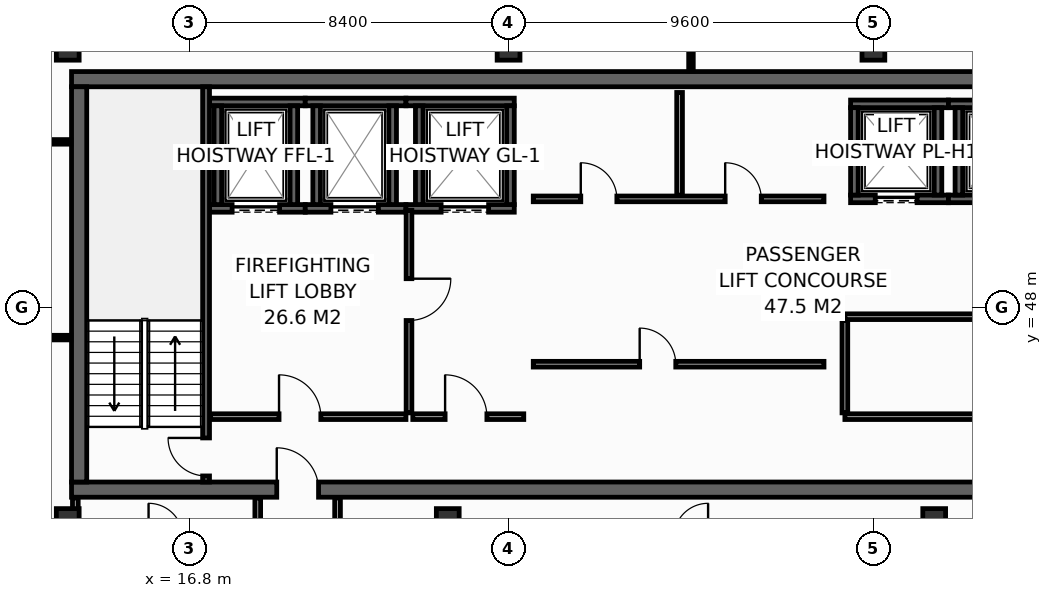
"""IFC4 building model, lengths in metres.
Left out: names, types, materials, properties, quantities, classifications, styles, units other than length and angle.
Written with IfcOpenShell. Run it as: python <this file> out.ifc"""

import sys

from ifc_helpers import new_model, si_unit, direction, frame, frame_2d, origin, origin_2d, place, context, subcontext, project, spatial, rectangle, hollow_rectangle, extrude, element, fill, save


model = new_model("IFC4")
c1 = context("Model", 3, precision=1e-05, world=origin(), true_north=direction((0.0, 1.0)))
c2 = subcontext(c1, "Body", "Model", "MODEL_VIEW")
j1 = project(units=[si_unit("LENGTHUNIT", "METRE"), si_unit("PLANEANGLEUNIT", "RADIAN")], contexts=[c1])
p1 = place(None, origin())
s1 = spatial("IfcSite", under=j1, at=p1, CompositionType="ELEMENT")
p2 = place(p1, origin())
s2 = spatial("IfcBuilding", under=s1, at=p2, CompositionType="ELEMENT")
p3 = place(p2, frame((0.0, 0.0, 306.6)))
s3 = spatial("IfcBuildingStorey", under=s2, at=p3, CompositionType="ELEMENT", Elevation=306.6)
p4 = place(p3, frame((13.7, 43.2, 0.0), z_axis=(0.0, 0.0, 1.0), x_axis=(1.0, 0.0, 0.0)))
e1 = element("IfcWall", 1, at=p4, inside=s3, PredefinedType="SHEAR", context=c2, shape_type="SweptSolid", body=[
    extrude(rectangle(XDim=32.5, YDim=0.4, at=frame_2d((16.25, 0.0))), origin(), (0.0, 0.0, 1.0), 3.55),
])
p5 = place(p4, frame((5.4, 0.0, 0.0)))
e2 = element("IfcOpeningElement", 2, at=p5, cuts=e1, PredefinedType="OPENING", context=c2, shape_type="SweptSolid", body=[
    extrude(rectangle(XDim=1.1, YDim=2.15, at=frame_2d((0.55, 1.075))), frame((0.0, 0.21, 0.0), z_axis=(0.0, -1.0, 0.0), x_axis=(1.0, 0.0, 0.0)), (0.0, 0.0, 1.0), 0.42),
])
p6 = place(p4, frame((25.6, 0.0, 0.0)))
e3 = element("IfcOpeningElement", 3, at=p6, cuts=e1, PredefinedType="OPENING", context=c2, shape_type="SweptSolid", body=[
    extrude(rectangle(XDim=1.1, YDim=2.15, at=frame_2d((0.55, 1.075))), frame((0.0, 0.21, 0.0), z_axis=(0.0, -1.0, 0.0), x_axis=(1.0, 0.0, 0.0)), (0.0, 0.0, 1.0), 0.42),
])
p7 = place(p3, frame((13.7, 54.0, 0.0), z_axis=(0.0, 0.0, 1.0), x_axis=(1.0, 0.0, 0.0)))
e4 = element("IfcWall", 4, at=p7, inside=s3, PredefinedType="SHEAR", context=c2, shape_type="SweptSolid", body=[
    extrude(rectangle(XDim=32.5, YDim=0.4, at=frame_2d((16.25, 0.0))), origin(), (0.0, 0.0, 1.0), 3.55),
])
p8 = place(p3, frame((13.9, 43.4, 0.0), z_axis=(0.0, 0.0, 1.0), x_axis=(0.0, 1.0, 0.0)))
e5 = element("IfcWall", 5, at=p8, inside=s3, PredefinedType="SHEAR", context=c2, shape_type="SweptSolid", body=[
    extrude(rectangle(XDim=10.4, YDim=0.4, at=frame_2d((5.2, 0.0))), origin(), (0.0, 0.0, 1.0), 3.55),
])
for number, where, z_axis, x_axis in (
    (6, (13.6, 54.8, 0.0), (0.0, 0.0, 1.0), (1.0, 0.0, 0.0)),
    (7, (25.2, 54.8, 0.0), (0.0, 0.0, 1.0), (1.0, 0.0, 0.0)),
    (8, (34.8, 54.8, 0.0), (0.0, 0.0, 1.0), (1.0, 0.0, 0.0)),
    (9, (13.6, 42.4, 0.0), (0.0, 0.0, 1.0), (1.0, 0.0, 0.0)),
    (10, (23.6, 42.4, 0.0), (0.0, 0.0, 1.0), (1.0, 0.0, 0.0)),
    (11, (36.4, 42.4, 0.0), (0.0, 0.0, 1.0), (1.0, 0.0, 0.0)),
):
    element("IfcColumn", number, at=place(p3, frame(where, z_axis=z_axis, x_axis=x_axis)), inside=s3, PredefinedType="COLUMN", context=c2, shape_type="SweptSolid", body=[
        extrude(hollow_rectangle(XDim=0.6, YDim=0.6, WallThickness=0.028, at=origin_2d()), origin(), (0.0, 0.0, 1.0), 3.8),
    ])
p9 = place(p3, frame((17.33, 50.6, 0.0), z_axis=(0.0, 0.0, 1.0), x_axis=(1.0, 0.0, 0.0)))
e12 = element("IfcWall", 12, at=p9, inside=s3, PredefinedType="SHEAR", context=c2, shape_type="SweptSolid", body=[
    extrude(rectangle(XDim=2.52, YDim=0.2, at=frame_2d((1.26, 0.0))), origin(), (0.0, 0.0, 1.0), 3.55),
])
p10 = place(p9, frame((0.595, 0.0, 0.0)))
e13 = element("IfcOpeningElement", 13, at=p10, cuts=e12, PredefinedType="OPENING", context=c2, shape_type="SweptSolid", body=[
    extrude(rectangle(XDim=1.25, YDim=2.3, at=frame_2d((0.625, 1.15))), frame((0.0, 0.11, 0.0), z_axis=(0.0, -1.0, 0.0), x_axis=(1.0, 0.0, 0.0)), (0.0, 0.0, 1.0), 0.22),
])
p11 = place(p3, frame((17.33, 53.4, 0.0), z_axis=(0.0, 0.0, 1.0), x_axis=(1.0, 0.0, 0.0)))
e14 = element("IfcWall", 14, at=p11, inside=s3, PredefinedType="SHEAR", context=c2, shape_type="SweptSolid", body=[
    extrude(rectangle(XDim=2.52, YDim=0.2, at=frame_2d((1.26, 0.0))), origin(), (0.0, 0.0, 1.0), 3.55),
])
for number, where, z_axis, x_axis in (
    (15, (17.55, 50.7, 0.0), (0.0, 0.0, 1.0), (0.0, 1.0, 0.0)),
    (16, (19.55, 50.7, 0.0), (0.0, 0.0, 1.0), (0.0, 1.0, 0.0)),
):
    element("IfcWall", number, at=place(p3, frame(where, z_axis=z_axis, x_axis=x_axis)), inside=s3, PredefinedType="SHEAR", context=c2, shape_type="SweptSolid", body=[
        extrude(rectangle(XDim=2.6, YDim=0.2, at=frame_2d((1.3, 0.0))), origin(), (0.0, 0.0, 1.0), 3.55),
    ])
p12 = place(p3, frame((19.85, 50.6, 0.0), z_axis=(0.0, 0.0, 1.0), x_axis=(1.0, 0.0, 0.0)))
e17 = element("IfcWall", 17, at=p12, inside=s3, PredefinedType="SHEAR", context=c2, shape_type="SweptSolid", body=[
    extrude(rectangle(XDim=2.65, YDim=0.2, at=frame_2d((1.325, 0.0))), origin(), (0.0, 0.0, 1.0), 3.55),
])
p13 = place(p12, frame((0.675, 0.0, 0.0)))
e18 = element("IfcOpeningElement", 18, at=p13, cuts=e17, PredefinedType="OPENING", context=c2, shape_type="SweptSolid", body=[
    extrude(rectangle(XDim=1.25, YDim=2.3, at=frame_2d((0.625, 1.15))), frame((0.0, 0.11, 0.0), z_axis=(0.0, -1.0, 0.0), x_axis=(1.0, 0.0, 0.0)), (0.0, 0.0, 1.0), 0.22),
])
p14 = place(p3, frame((19.85, 53.4, 0.0), z_axis=(0.0, 0.0, 1.0), x_axis=(1.0, 0.0, 0.0)))
e19 = element("IfcWall", 19, at=p14, inside=s3, PredefinedType="SHEAR", context=c2, shape_type="SweptSolid", body=[
    extrude(rectangle(XDim=2.65, YDim=0.2, at=frame_2d((1.325, 0.0))), origin(), (0.0, 0.0, 1.0), 3.55),
])
for number, where, z_axis, x_axis in (
    (20, (20.15, 50.7, 0.0), (0.0, 0.0, 1.0), (0.0, 1.0, 0.0)),
    (21, (22.15, 50.7, 0.0), (0.0, 0.0, 1.0), (0.0, 1.0, 0.0)),
):
    element("IfcWall", number, at=place(p3, frame(where, z_axis=z_axis, x_axis=x_axis)), inside=s3, PredefinedType="SHEAR", context=c2, shape_type="SweptSolid", body=[
        extrude(rectangle(XDim=2.6, YDim=0.2, at=frame_2d((1.3, 0.0))), origin(), (0.0, 0.0, 1.0), 3.55),
    ])
p15 = place(p3, frame((22.5, 50.6, 0.0), z_axis=(0.0, 0.0, 1.0), x_axis=(1.0, 0.0, 0.0)))
e22 = element("IfcWall", 22, at=p15, inside=s3, PredefinedType="SHEAR", context=c2, shape_type="SweptSolid", body=[
    extrude(rectangle(XDim=2.85, YDim=0.2, at=frame_2d((1.425, 0.0))), origin(), (0.0, 0.0, 1.0), 3.55),
])
p16 = place(p15, frame((0.925, 0.0, 0.0)))
e23 = element("IfcOpeningElement", 23, at=p16, cuts=e22, PredefinedType="OPENING", context=c2, shape_type="SweptSolid", body=[
    extrude(rectangle(XDim=1.25, YDim=2.3, at=frame_2d((0.625, 1.15))), frame((0.0, 0.11, 0.0), z_axis=(0.0, -1.0, 0.0), x_axis=(1.0, 0.0, 0.0)), (0.0, 0.0, 1.0), 0.22),
])
p17 = place(p3, frame((22.5, 53.4, 0.0), z_axis=(0.0, 0.0, 1.0), x_axis=(1.0, 0.0, 0.0)))
e24 = element("IfcWall", 24, at=p17, inside=s3, PredefinedType="SHEAR", context=c2, shape_type="SweptSolid", body=[
    extrude(rectangle(XDim=2.85, YDim=0.2, at=frame_2d((1.425, 0.0))), origin(), (0.0, 0.0, 1.0), 3.55),
])
for number, where, z_axis, x_axis in (
    (25, (22.85, 50.7, 0.0), (0.0, 0.0, 1.0), (0.0, 1.0, 0.0)),
    (26, (25.25, 50.7, 0.0), (0.0, 0.0, 1.0), (0.0, 1.0, 0.0)),
):
    element("IfcWall", number, at=place(p3, frame(where, z_axis=z_axis, x_axis=x_axis)), inside=s3, PredefinedType="SHEAR", context=c2, shape_type="SweptSolid", body=[
        extrude(rectangle(XDim=2.6, YDim=0.2, at=frame_2d((1.3, 0.0))), origin(), (0.0, 0.0, 1.0), 3.55),
    ])
p18 = place(p3, frame((34.2, 50.85, 0.0), z_axis=(0.0, 0.0, 1.0), x_axis=(1.0, 0.0, 0.0)))
e27 = element("IfcWall", 27, at=p18, inside=s3, PredefinedType="SHEAR", context=c2, shape_type="SweptSolid", body=[
    extrude(rectangle(XDim=2.575, YDim=0.2, at=frame_2d((1.288, 0.0))), origin(), (0.0, 0.0, 1.0), 3.55),
])
p19 = place(p18, frame((0.65, 0.0, 0.0)))
e28 = element("IfcOpeningElement", 28, at=p19, cuts=e27, PredefinedType="OPENING", context=c2, shape_type="SweptSolid", body=[
    extrude(rectangle(XDim=1.1, YDim=2.2, at=frame_2d((0.55, 1.1))), frame((0.0, 0.11, 0.0), z_axis=(0.0, -1.0, 0.0), x_axis=(1.0, 0.0, 0.0)), (0.0, 0.0, 1.0), 0.22),
])
p20 = place(p3, frame((34.2, 53.35, 0.0), z_axis=(0.0, 0.0, 1.0), x_axis=(1.0, 0.0, 0.0)))
e29 = element("IfcWall", 29, at=p20, inside=s3, PredefinedType="SHEAR", context=c2, shape_type="SweptSolid", body=[
    extrude(rectangle(XDim=2.575, YDim=0.2, at=frame_2d((1.288, 0.0))), origin(), (0.0, 0.0, 1.0), 3.55),
])
for number, where, z_axis, x_axis in (
    (30, (34.3, 50.95, 0.0), (0.0, 0.0, 1.0), (0.0, 1.0, 0.0)),
    (31, (36.5, 50.95, 0.0), (0.0, 0.0, 1.0), (0.0, 1.0, 0.0)),
):
    element("IfcWall", number, at=place(p3, frame(where, z_axis=z_axis, x_axis=x_axis)), inside=s3, PredefinedType="SHEAR", context=c2, shape_type="SweptSolid", body=[
        extrude(rectangle(XDim=2.3, YDim=0.2, at=frame_2d((1.15, 0.0))), origin(), (0.0, 0.0, 1.0), 3.55),
    ])
p21 = place(p3, frame((36.775, 50.85, 0.0), z_axis=(0.0, 0.0, 1.0), x_axis=(1.0, 0.0, 0.0)))
e32 = element("IfcWall", 32, at=p21, inside=s3, PredefinedType="SHEAR", context=c2, shape_type="SweptSolid", body=[
    extrude(rectangle(XDim=2.75, YDim=0.2, at=frame_2d((1.375, 0.0))), origin(), (0.0, 0.0, 1.0), 3.55),
])
p22 = place(p21, frame((0.825, 0.0, 0.0)))
e33 = element("IfcOpeningElement", 33, at=p22, cuts=e32, PredefinedType="OPENING", context=c2, shape_type="SweptSolid", body=[
    extrude(rectangle(XDim=1.1, YDim=2.2, at=frame_2d((0.55, 1.1))), frame((0.0, 0.11, 0.0), z_axis=(0.0, -1.0, 0.0), x_axis=(1.0, 0.0, 0.0)), (0.0, 0.0, 1.0), 0.22),
])
p23 = place(p3, frame((36.775, 53.35, 0.0), z_axis=(0.0, 0.0, 1.0), x_axis=(1.0, 0.0, 0.0)))
e34 = element("IfcWall", 34, at=p23, inside=s3, PredefinedType="SHEAR", context=c2, shape_type="SweptSolid", body=[
    extrude(rectangle(XDim=2.75, YDim=0.2, at=frame_2d((1.375, 0.0))), origin(), (0.0, 0.0, 1.0), 3.55),
])
p24 = place(p3, frame((37.05, 50.95, 0.0), z_axis=(0.0, 0.0, 1.0), x_axis=(0.0, 1.0, 0.0)))
e35 = element("IfcWall", 35, at=p24, inside=s3, PredefinedType="SHEAR", context=c2, shape_type="SweptSolid", body=[
    extrude(rectangle(XDim=2.3, YDim=0.2, at=frame_2d((1.15, 0.0))), origin(), (0.0, 0.0, 1.0), 3.55),
])
p25 = place(p3, frame((17.24, 43.4, 0.0), z_axis=(0.0, 0.0, 1.0), x_axis=(0.0, 1.0, 0.0)))
e36 = element("IfcWall", 36, at=p25, inside=s3, PredefinedType="SHEAR", context=c2, shape_type="SweptSolid", body=[
    extrude(rectangle(XDim=10.4, YDim=0.18, at=frame_2d((5.2, 0.0))), origin(), (0.0, 0.0, 1.0), 3.55),
])
p26 = place(p25, frame((0.16, 0.0, 0.0)))
e37 = element("IfcOpeningElement", 37, at=p26, cuts=e36, PredefinedType="OPENING", context=c2, shape_type="SweptSolid", body=[
    extrude(rectangle(XDim=1.0, YDim=2.15, at=frame_2d((0.5, 1.075))), frame((0.0, 0.1, 0.0), z_axis=(0.0, -1.0, 0.0), x_axis=(1.0, 0.0, 0.0)), (0.0, 0.0, 1.0), 0.2),
])
p27 = place(p3, frame((17.36, 45.12, 0.0), z_axis=(0.0, 0.0, 1.0), x_axis=(1.0, 0.0, 0.0)))
e38 = element("IfcWall", 38, at=p27, inside=s3, PredefinedType="PARTITIONING", context=c2, shape_type="SweptSolid", body=[
    extrude(rectangle(XDim=5.14, YDim=0.15, at=frame_2d((2.57, 0.0))), origin(), (0.0, 0.0, 1.0), 3.55),
])
p28 = place(p27, frame((1.8, 0.0, 0.0)))
e39 = element("IfcOpeningElement", 39, at=p28, cuts=e38, PredefinedType="OPENING", context=c2, shape_type="SweptSolid", body=[
    extrude(rectangle(XDim=1.1, YDim=2.15, at=frame_2d((0.55, 1.075))), frame((0.0, 0.085, 0.0), z_axis=(0.0, -1.0, 0.0), x_axis=(1.0, 0.0, 0.0)), (0.0, 0.0, 1.0), 0.17),
])
p29 = place(p3, frame((22.58, 50.55, 0.0), z_axis=(0.0, 0.0, 1.0), x_axis=(0.0, -1.0, 0.0)))
e40 = element("IfcWall", 40, at=p29, inside=s3, PredefinedType="PARTITIONING", context=c2, shape_type="SweptSolid", body=[
    extrude(rectangle(XDim=5.33, YDim=0.15, at=frame_2d((2.665, 0.0))), origin(), (0.0, 0.0, 1.0), 3.55),
])
p30 = place(p29, frame((1.8, 0.0, 0.0)))
e41 = element("IfcOpeningElement", 41, at=p30, cuts=e40, PredefinedType="OPENING", context=c2, shape_type="SweptSolid", body=[
    extrude(rectangle(XDim=1.1, YDim=2.15, at=frame_2d((0.55, 1.075))), frame((0.0, 0.085, 0.0), z_axis=(0.0, -1.0, 0.0), x_axis=(1.0, 0.0, 0.0)), (0.0, 0.0, 1.0), 0.17),
])
p31 = place(p3, frame((22.68, 45.12, 0.0), z_axis=(0.0, 0.0, 1.0), x_axis=(1.0, 0.0, 0.0)))
e42 = element("IfcWall", 42, at=p31, inside=s3, PredefinedType="PARTITIONING", context=c2, shape_type="SweptSolid", body=[
    extrude(rectangle(XDim=2.92, YDim=0.15, at=frame_2d((1.46, 0.0))), origin(), (0.0, 0.0, 1.0), 3.55),
])
p32 = place(p31, frame((0.85, 0.0, 0.0)))
e43 = element("IfcOpeningElement", 43, at=p32, cuts=e42, PredefinedType="OPENING", context=c2, shape_type="SweptSolid", body=[
    extrude(rectangle(XDim=1.1, YDim=2.15, at=frame_2d((0.55, 1.075))), frame((0.0, 0.085, 0.0), z_axis=(0.0, -1.0, 0.0), x_axis=(1.0, 0.0, 0.0)), (0.0, 0.0, 1.0), 0.17),
])
p33 = place(p3, frame((34.05, 45.12, 0.0), z_axis=(0.0, 0.0, 1.0), x_axis=(1.0, 0.0, 0.0)))
e44 = element("IfcWall", 44, at=p33, inside=s3, PredefinedType="PARTITIONING", context=c2, shape_type="SweptSolid", body=[
    extrude(rectangle(XDim=8.45, YDim=0.15, at=frame_2d((4.225, 0.0))), origin(), (0.0, 0.0, 1.0), 3.55),
])
p34 = place(p33, frame((3.6, 0.0, 0.0)))
e45 = element("IfcOpeningElement", 45, at=p34, cuts=e44, PredefinedType="OPENING", context=c2, shape_type="SweptSolid", body=[
    extrude(rectangle(XDim=0.95, YDim=2.15, at=frame_2d((0.475, 1.075))), frame((0.0, 0.085, 0.0), z_axis=(0.0, -1.0, 0.0), x_axis=(1.0, 0.0, 0.0)), (0.0, 0.0, 1.0), 0.17),
])
p35 = place(p3, frame((34.05, 47.75, 0.0), z_axis=(0.0, 0.0, 1.0), x_axis=(1.0, 0.0, 0.0)))
e46 = element("IfcWall", 46, at=p35, inside=s3, PredefinedType="PARTITIONING", context=c2, shape_type="SweptSolid", body=[
    extrude(rectangle(XDim=8.45, YDim=0.15, at=frame_2d((4.225, 0.0))), origin(), (0.0, 0.0, 1.0), 3.55),
])
p36 = place(p3, frame((34.05, 45.22, 0.0), z_axis=(0.0, 0.0, 1.0), x_axis=(0.0, 1.0, 0.0)))
e47 = element("IfcWall", 47, at=p36, inside=s3, PredefinedType="PARTITIONING", context=c2, shape_type="SweptSolid", body=[
    extrude(rectangle(XDim=2.43, YDim=0.15, at=frame_2d((1.215, 0.0))), origin(), (0.0, 0.0, 1.0), 3.55),
])
p37 = place(p3, frame((25.85, 50.85, 0.0), z_axis=(0.0, 0.0, 1.0), x_axis=(1.0, 0.0, 0.0)))
e48 = element("IfcWall", 48, at=p37, inside=s3, PredefinedType="PARTITIONING", context=c2, shape_type="SweptSolid", body=[
    extrude(rectangle(XDim=7.65, YDim=0.15, at=frame_2d((3.825, 0.0))), origin(), (0.0, 0.0, 1.0), 3.55),
])
p38 = place(p37, frame((1.25, 0.0, 0.0)))
e49 = element("IfcOpeningElement", 49, at=p38, cuts=e48, PredefinedType="OPENING", context=c2, shape_type="SweptSolid", body=[
    extrude(rectangle(XDim=0.95, YDim=2.15, at=frame_2d((0.475, 1.075))), frame((0.0, 0.085, 0.0), z_axis=(0.0, -1.0, 0.0), x_axis=(1.0, 0.0, 0.0)), (0.0, 0.0, 1.0), 0.17),
])
p39 = place(p37, frame((5.05, 0.0, 0.0)))
e50 = element("IfcOpeningElement", 50, at=p39, cuts=e48, PredefinedType="OPENING", context=c2, shape_type="SweptSolid", body=[
    extrude(rectangle(XDim=0.95, YDim=2.15, at=frame_2d((0.475, 1.075))), frame((0.0, 0.085, 0.0), z_axis=(0.0, -1.0, 0.0), x_axis=(1.0, 0.0, 0.0)), (0.0, 0.0, 1.0), 0.17),
])
p40 = place(p3, frame((29.7, 50.95, 0.0), z_axis=(0.0, 0.0, 1.0), x_axis=(0.0, 1.0, 0.0)))
e51 = element("IfcWall", 51, at=p40, inside=s3, PredefinedType="PARTITIONING", context=c2, shape_type="SweptSolid", body=[
    extrude(rectangle(XDim=2.7, YDim=0.15, at=frame_2d((1.35, 0.0))), origin(), (0.0, 0.0, 1.0), 3.55),
])
p41 = place(p3, frame((25.85, 46.5, 0.0), z_axis=(0.0, 0.0, 1.0), x_axis=(1.0, 0.0, 0.0)))
e52 = element("IfcWall", 52, at=p41, inside=s3, PredefinedType="PARTITIONING", context=c2, shape_type="SweptSolid", body=[
    extrude(rectangle(XDim=7.65, YDim=0.15, at=frame_2d((3.825, 0.0))), origin(), (0.0, 0.0, 1.0), 3.55),
])
p42 = place(p41, frame((2.8, 0.0, 0.0)))
e53 = element("IfcOpeningElement", 53, at=p42, cuts=e52, PredefinedType="OPENING", context=c2, shape_type="SweptSolid", body=[
    extrude(rectangle(XDim=0.95, YDim=2.15, at=frame_2d((0.475, 1.075))), frame((0.0, 0.085, 0.0), z_axis=(0.0, -1.0, 0.0), x_axis=(1.0, 0.0, 0.0)), (0.0, 0.0, 1.0), 0.17),
])
p43 = place(p3, frame((11.5, 52.35, 0.0), z_axis=(0.0, 0.0, 1.0), x_axis=(1.0, 0.0, 0.0)))
e54 = element("IfcWall", 54, at=p43, inside=s3, PredefinedType="PARTITIONING", context=c2, shape_type="SweptSolid", body=[
    extrude(rectangle(XDim=2.18, YDim=0.12, at=frame_2d((1.09, 0.0))), origin(), (0.0, 0.0, 1.0), 3.55),
])
p44 = place(p3, frame((30.0, 54.22, 0.0), z_axis=(0.0, 0.0, 1.0), x_axis=(0.0, 1.0, 0.0)))
e55 = element("IfcWall", 55, at=p44, inside=s3, PredefinedType="PARTITIONING", context=c2, shape_type="SweptSolid", body=[
    extrude(rectangle(XDim=1.775, YDim=0.12, at=frame_2d((0.888, 0.0))), origin(), (0.0, 0.0, 1.0), 2.935),
])
p45 = place(p3, frame((11.5, 47.2, 0.0), z_axis=(0.0, 0.0, 1.0), x_axis=(1.0, 0.0, 0.0)))
e56 = element("IfcWall", 56, at=p45, inside=s3, PredefinedType="PARTITIONING", context=c2, shape_type="SweptSolid", body=[
    extrude(rectangle(XDim=2.18, YDim=0.12, at=frame_2d((1.09, 0.0))), origin(), (0.0, 0.0, 1.0), 3.55),
])
p46 = place(p3, frame((13.8, 42.02, 0.0), z_axis=(0.0, 0.0, 1.0), x_axis=(0.0, 1.0, 0.0)))
e57 = element("IfcWall", 57, at=p46, inside=s3, PredefinedType="PARTITIONING", context=c2, shape_type="SweptSolid", body=[
    extrude(rectangle(XDim=0.96, YDim=0.15, at=frame_2d((0.48, 0.0))), origin(), (0.0, 0.0, 1.0), 3.55),
])
for number, where, z_axis, x_axis in (
    (58, (18.6, 41.94, 0.0), (0.0, 0.0, 1.0), (0.0, 1.0, 0.0)),
    (59, (20.7, 41.94, 0.0), (0.0, 0.0, 1.0), (0.0, 1.0, 0.0)),
):
    element("IfcWall", number, at=place(p3, frame(where, z_axis=z_axis, x_axis=x_axis)), inside=s3, PredefinedType="PARTITIONING", context=c2, shape_type="SweptSolid", body=[
        extrude(rectangle(XDim=1.04, YDim=0.15, at=frame_2d((0.52, 0.0))), origin(), (0.0, 0.0, 1.0), 3.55),
    ])
p47 = place(p10, origin())
e60 = element("IfcDoor", 60, at=p47, inside=s3, OperationType="SLIDING_TO_LEFT", PredefinedType="DOOR", context=c2, shape_type="SweptSolid", body=[
    extrude(rectangle(XDim=1.25, YDim=2.3, at=frame_2d((0.625, 1.15))), frame((0.0, 0.025, 0.0), z_axis=(0.0, -1.0, 0.0), x_axis=(1.0, 0.0, 0.0)), (0.0, 0.0, 1.0), 0.05),
])
fill(e13, e60)
p48 = place(p13, origin())
e61 = element("IfcDoor", 61, at=p48, inside=s3, OperationType="SLIDING_TO_LEFT", PredefinedType="DOOR", context=c2, shape_type="SweptSolid", body=[
    extrude(rectangle(XDim=1.25, YDim=2.3, at=frame_2d((0.625, 1.15))), frame((0.0, 0.025, 0.0), z_axis=(0.0, -1.0, 0.0), x_axis=(1.0, 0.0, 0.0)), (0.0, 0.0, 1.0), 0.05),
])
fill(e18, e61)
p49 = place(p16, origin())
e62 = element("IfcDoor", 62, at=p49, inside=s3, OperationType="SLIDING_TO_LEFT", PredefinedType="DOOR", context=c2, shape_type="SweptSolid", body=[
    extrude(rectangle(XDim=1.25, YDim=2.3, at=frame_2d((0.625, 1.15))), frame((0.0, 0.025, 0.0), z_axis=(0.0, -1.0, 0.0), x_axis=(1.0, 0.0, 0.0)), (0.0, 0.0, 1.0), 0.05),
])
fill(e23, e62)
p50 = place(p19, origin())
e63 = element("IfcDoor", 63, at=p50, inside=s3, OperationType="SLIDING_TO_LEFT", PredefinedType="DOOR", context=c2, shape_type="SweptSolid", body=[
    extrude(rectangle(XDim=1.1, YDim=2.2, at=frame_2d((0.55, 1.1))), frame((0.0, 0.025, 0.0), z_axis=(0.0, -1.0, 0.0), x_axis=(1.0, 0.0, 0.0)), (0.0, 0.0, 1.0), 0.05),
])
fill(e28, e63)
p51 = place(p26, origin())
e64 = element("IfcDoor", 64, at=p51, inside=s3, OperationType="SINGLE_SWING_RIGHT", PredefinedType="DOOR", context=c2, shape_type="SweptSolid", body=[
    extrude(rectangle(XDim=1.0, YDim=2.15, at=frame_2d((0.5, 1.075))), frame((0.0, 0.025, 0.0), z_axis=(0.0, -1.0, 0.0), x_axis=(1.0, 0.0, 0.0)), (0.0, 0.0, 1.0), 0.05),
])
fill(e37, e64)
p52 = place(p28, origin())
e65 = element("IfcDoor", 65, at=p52, inside=s3, OperationType="SINGLE_SWING_LEFT", PredefinedType="DOOR", context=c2, shape_type="SweptSolid", body=[
    extrude(rectangle(XDim=1.1, YDim=2.15, at=frame_2d((0.55, 1.075))), frame((0.0, 0.025, 0.0), z_axis=(0.0, -1.0, 0.0), x_axis=(1.0, 0.0, 0.0)), (0.0, 0.0, 1.0), 0.05),
])
fill(e39, e65)
p53 = place(p30, origin())
e66 = element("IfcDoor", 66, at=p53, inside=s3, OperationType="SINGLE_SWING_LEFT", PredefinedType="DOOR", context=c2, shape_type="SweptSolid", body=[
    extrude(rectangle(XDim=1.1, YDim=2.15, at=frame_2d((0.55, 1.075))), frame((0.0, 0.025, 0.0), z_axis=(0.0, -1.0, 0.0), x_axis=(1.0, 0.0, 0.0)), (0.0, 0.0, 1.0), 0.05),
])
fill(e41, e66)
p54 = place(p32, origin())
e67 = element("IfcDoor", 67, at=p54, inside=s3, OperationType="SINGLE_SWING_LEFT", PredefinedType="DOOR", context=c2, shape_type="SweptSolid", body=[
    extrude(rectangle(XDim=1.1, YDim=2.15, at=frame_2d((0.55, 1.075))), frame((0.0, 0.025, 0.0), z_axis=(0.0, -1.0, 0.0), x_axis=(1.0, 0.0, 0.0)), (0.0, 0.0, 1.0), 0.05),
])
fill(e43, e67)
p55 = place(p5, origin())
e68 = element("IfcDoor", 68, at=p55, inside=s3, OperationType="SINGLE_SWING_LEFT", PredefinedType="DOOR", context=c2, shape_type="SweptSolid", body=[
    extrude(rectangle(XDim=1.1, YDim=2.15, at=frame_2d((0.55, 1.075))), frame((0.0, 0.025, 0.0), z_axis=(0.0, -1.0, 0.0), x_axis=(1.0, 0.0, 0.0)), (0.0, 0.0, 1.0), 0.05),
])
fill(e2, e68)
p56 = place(p38, origin())
e69 = element("IfcDoor", 69, at=p56, inside=s3, OperationType="SINGLE_SWING_LEFT", PredefinedType="DOOR", context=c2, shape_type="SweptSolid", body=[
    extrude(rectangle(XDim=0.95, YDim=2.15, at=frame_2d((0.475, 1.075))), frame((0.0, 0.025, 0.0), z_axis=(0.0, -1.0, 0.0), x_axis=(1.0, 0.0, 0.0)), (0.0, 0.0, 1.0), 0.05),
])
fill(e49, e69)
p57 = place(p39, origin())
e70 = element("IfcDoor", 70, at=p57, inside=s3, OperationType="SINGLE_SWING_LEFT", PredefinedType="DOOR", context=c2, shape_type="SweptSolid", body=[
    extrude(rectangle(XDim=0.95, YDim=2.15, at=frame_2d((0.475, 1.075))), frame((0.0, 0.025, 0.0), z_axis=(0.0, -1.0, 0.0), x_axis=(1.0, 0.0, 0.0)), (0.0, 0.0, 1.0), 0.05),
])
fill(e50, e70)
p58 = place(p42, origin())
e71 = element("IfcDoor", 71, at=p58, inside=s3, OperationType="SINGLE_SWING_LEFT", PredefinedType="DOOR", context=c2, shape_type="SweptSolid", body=[
    extrude(rectangle(XDim=0.95, YDim=2.15, at=frame_2d((0.475, 1.075))), frame((0.0, 0.025, 0.0), z_axis=(0.0, -1.0, 0.0), x_axis=(1.0, 0.0, 0.0)), (0.0, 0.0, 1.0), 0.05),
])
fill(e53, e71)
save(model, sys.argv[1])
